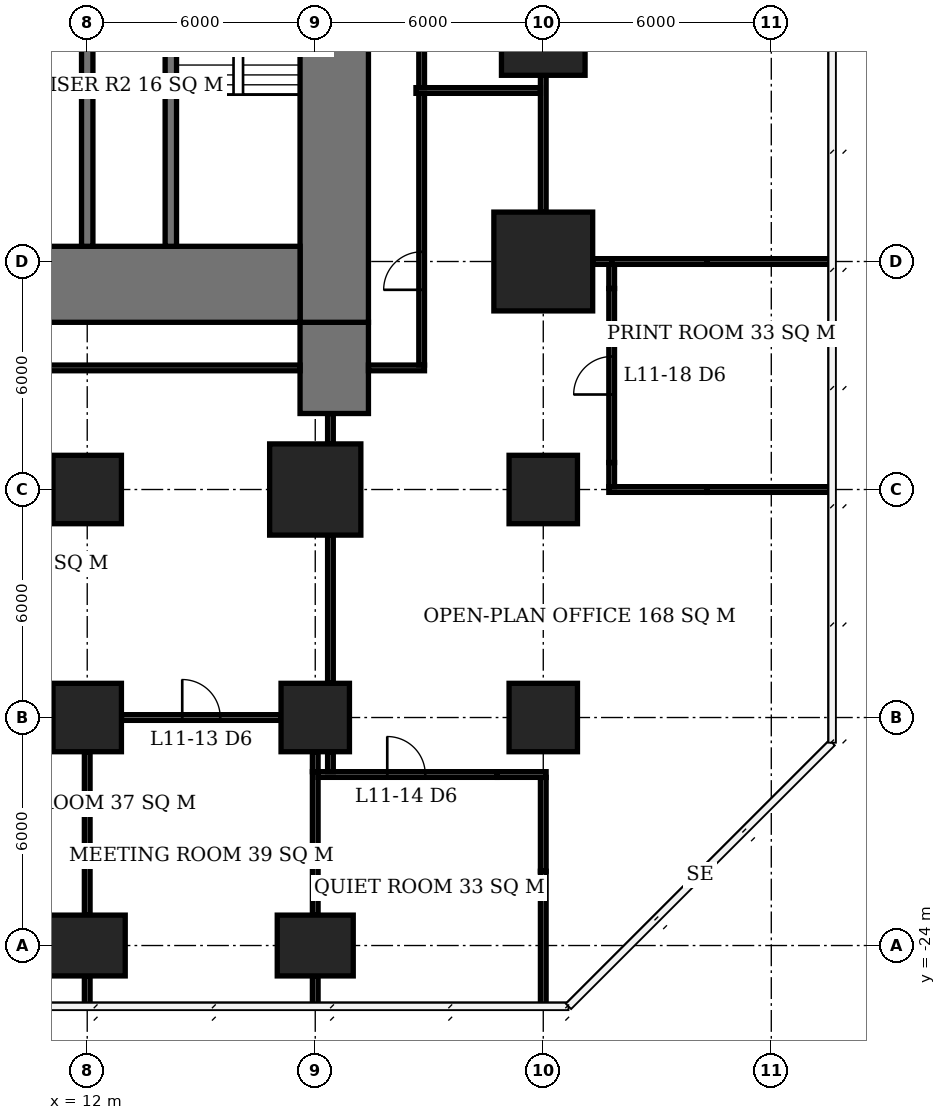
"""IFC4 building model, lengths in metres.
Left out: names, types, materials, properties, quantities, classifications, styles, units other than length and angle.
Written with IfcOpenShell. Run it as: python <this file> out.ifc"""

import sys

from ifc_helpers import new_model, si_unit, direction, frame, frame_2d, origin, origin_2d, place, context, subcontext, project, spatial, rectangle, extrude, element, fill, save


model = new_model("IFC4")
c1 = context("Model", 3, precision=1e-05, world=origin(), true_north=direction((0.0, 1.0)))
c2 = subcontext(c1, "Body", "Model", "MODEL_VIEW")
j1 = project(units=[si_unit("LENGTHUNIT", "METRE"), si_unit("PLANEANGLEUNIT", "RADIAN")], contexts=[c1])
p1 = place(None, origin())
s1 = spatial("IfcSite", under=j1, at=p1, CompositionType="ELEMENT")
p2 = place(p1, origin())
s2 = spatial("IfcBuilding", under=s1, at=p2, CompositionType="ELEMENT")
p3 = place(p2, frame((0.0, 0.0, 49.4)))
s3 = spatial("IfcBuildingStorey", under=s2, at=p3, CompositionType="ELEMENT", Elevation=49.4)
p4 = place(p3, frame((12.0, -24.0, 0.0), z_axis=(0.0, 0.0, 1.0), x_axis=(1.0, 0.0, 0.0)))
e1 = element("IfcColumn", 1, at=p4, inside=s3, PredefinedType="COLUMN", context=c2, shape_type="SweptSolid", body=[
    extrude(rectangle(XDim=2.0, YDim=1.6, at=origin_2d()), origin(), (0.0, 0.0, 1.0), 3.9),
])
for number, where, z_axis, x_axis in (
    (2, (12.0, -18.0, 0.0), (0.0, 0.0, 1.0), (1.0, 0.0, 0.0)),
    (3, (12.0, -12.0, 0.0), (0.0, 0.0, 1.0), (1.0, 0.0, 0.0)),
):
    element("IfcColumn", number, at=place(p3, frame(where, z_axis=z_axis, x_axis=x_axis)), inside=s3, PredefinedType="COLUMN", context=c2, shape_type="SweptSolid", body=[
        extrude(rectangle(XDim=1.8, YDim=1.8, at=origin_2d()), origin(), (0.0, 0.0, 1.0), 3.9),
    ])
p5 = place(p3, frame((18.0, -24.0, 0.0), z_axis=(0.0, 0.0, 1.0), x_axis=(1.0, 0.0, 0.0)))
e4 = element("IfcColumn", 4, at=p5, inside=s3, PredefinedType="COLUMN", context=c2, shape_type="SweptSolid", body=[
    extrude(rectangle(XDim=2.0, YDim=1.6, at=origin_2d()), origin(), (0.0, 0.0, 1.0), 3.9),
])
p6 = place(p3, frame((18.0, -18.0, 0.0), z_axis=(0.0, 0.0, 1.0), x_axis=(1.0, 0.0, 0.0)))
e5 = element("IfcColumn", 5, at=p6, inside=s3, PredefinedType="COLUMN", context=c2, shape_type="SweptSolid", body=[
    extrude(rectangle(XDim=1.8, YDim=1.8, at=origin_2d()), origin(), (0.0, 0.0, 1.0), 3.9),
])
p7 = place(p3, frame((18.0, -12.0, 0.0), z_axis=(0.0, 0.0, 1.0), x_axis=(1.0, 0.0, 0.0)))
e6 = element("IfcColumn", 6, at=p7, inside=s3, PredefinedType="COLUMN", context=c2, shape_type="SweptSolid", body=[
    extrude(rectangle(XDim=2.4, YDim=2.4, at=origin_2d()), origin(), (0.0, 0.0, 1.0), 3.9),
])
for number, where, z_axis, x_axis in (
    (7, (24.0, -18.0, 0.0), (0.0, 0.0, 1.0), (1.0, 0.0, 0.0)),
    (8, (24.0, -12.0, 0.0), (0.0, 0.0, 1.0), (1.0, 0.0, 0.0)),
):
    element("IfcColumn", number, at=place(p3, frame(where, z_axis=z_axis, x_axis=x_axis)), inside=s3, PredefinedType="COLUMN", context=c2, shape_type="SweptSolid", body=[
        extrude(rectangle(XDim=1.8, YDim=1.8, at=origin_2d()), origin(), (0.0, 0.0, 1.0), 3.9),
    ])
p8 = place(p3, frame((24.0, -6.0, 0.0), z_axis=(0.0, 0.0, 1.0), x_axis=(1.0, 0.0, 0.0)))
e9 = element("IfcColumn", 9, at=p8, inside=s3, PredefinedType="COLUMN", context=c2, shape_type="SweptSolid", body=[
    extrude(rectangle(XDim=2.6, YDim=2.6, at=origin_2d()), origin(), (0.0, 0.0, 1.0), 3.9),
])
p9 = place(p3, frame((24.0, 0.0, 0.0), z_axis=(0.0, 0.0, 1.0), x_axis=(1.0, 0.0, 0.0)))
e10 = element("IfcColumn", 10, at=p9, inside=s3, PredefinedType="COLUMN", context=c2, shape_type="SweptSolid", body=[
    extrude(rectangle(XDim=2.2, YDim=2.2, at=origin_2d()), origin(), (0.0, 0.0, 1.0), 3.9),
])
p10 = place(p3, frame((-5.6, -6.6, 0.0), z_axis=(0.0, 0.0, 1.0), x_axis=(1.0, 0.0, 0.0)))
e11 = element("IfcWall", 11, at=p10, inside=s3, PredefinedType="SHEAR", context=c2, shape_type="SweptSolid", body=[
    extrude(rectangle(XDim=23.2, YDim=2.0, at=frame_2d((11.6, 0.0))), origin(), (0.0, 0.0, 1.0), 3.9),
])
p11 = place(p3, frame((18.5, -7.6, 0.0), z_axis=(0.0, 0.0, 1.0), x_axis=(0.0, 1.0, 0.0)))
e12 = element("IfcWall", 12, at=p11, inside=s3, PredefinedType="SHEAR", context=c2, shape_type="SweptSolid", body=[
    extrude(rectangle(XDim=21.2, YDim=1.8, at=frame_2d((10.6, 0.0))), origin(), (0.0, 0.0, 1.0), 3.9),
])
p12 = place(p11, frame((9.2, 0.0, 0.0)))
e13 = element("IfcOpeningElement", 13, at=p12, cuts=e12, PredefinedType="OPENING", context=c2, shape_type="SweptSolid", body=[
    extrude(rectangle(XDim=1.8, YDim=2.4, at=frame_2d((0.9, 1.2))), frame((0.0, 0.91, 0.0), z_axis=(0.0, -1.0, 0.0), x_axis=(1.0, 0.0, 0.0)), (0.0, 0.0, 1.0), 1.82),
])
p13 = place(p3, frame((18.5, -10.0, 0.0), z_axis=(0.0, 0.0, 1.0), x_axis=(0.0, 1.0, 0.0)))
e14 = element("IfcWall", 14, at=p13, inside=s3, PredefinedType="SHEAR", context=c2, shape_type="SweptSolid", body=[
    extrude(rectangle(XDim=2.4, YDim=1.8, at=frame_2d((1.2, 0.0))), origin(), (0.0, 0.0, 1.0), 3.9),
])
p14 = place(p3, frame((12.0, -5.6, 0.0), z_axis=(0.0, 0.0, 1.0), x_axis=(0.0, 1.0, 0.0)))
e15 = element("IfcWall", 15, at=p14, inside=s3, PredefinedType="SHEAR", context=c2, shape_type="SweptSolid", body=[
    extrude(rectangle(XDim=5.45, YDim=0.3, at=frame_2d((2.725, 0.0))), origin(), (0.0, 0.0, 1.0), 3.9),
])
p15 = place(p3, frame((14.2, -5.6, 0.0), z_axis=(0.0, 0.0, 1.0), x_axis=(0.0, 1.0, 0.0)))
e16 = element("IfcWall", 16, at=p15, inside=s3, PredefinedType="SHEAR", context=c2, shape_type="SweptSolid", body=[
    extrude(rectangle(XDim=8.45, YDim=0.3, at=frame_2d((4.225, 0.0))), origin(), (0.0, 0.0, 1.0), 3.9),
])
p16 = place(p3, frame((18.075, -19.5, 0.0), z_axis=(0.0, 0.0, 1.0), x_axis=(1.0, 0.0, 0.0)))
e17 = element("IfcWall", 17, at=p16, inside=s3, PredefinedType="PARTITIONING", context=c2, shape_type="SweptSolid", body=[
    extrude(rectangle(XDim=4.715, YDim=0.15, at=frame_2d((2.357, 0.0))), origin(), (0.0, 0.0, 1.0), 3.65),
])
p17 = place(p16, frame((1.82, 0.0, 0.0)))
e18 = element("IfcOpeningElement", 18, at=p17, cuts=e17, PredefinedType="OPENING", context=c2, shape_type="SweptSolid", body=[
    extrude(rectangle(XDim=1.0, YDim=2.1, at=frame_2d((0.5, 1.05))), frame((0.0, 0.085, 0.0), z_axis=(0.0, -1.0, 0.0), x_axis=(1.0, 0.0, 0.0)), (0.0, 0.0, 1.0), 0.17),
])
p18 = place(p3, frame((22.79, -19.5, 0.0), z_axis=(0.0, 0.0, 1.0), x_axis=(1.0, 0.0, 0.0)))
e19 = element("IfcWall", 19, at=p18, inside=s3, PredefinedType="PARTITIONING", context=c2, shape_type="SweptSolid", body=[
    extrude(rectangle(XDim=1.285, YDim=0.15, at=frame_2d((0.643, 0.0))), origin(), (0.0, 0.0, 1.0), 2.65),
])
p19 = place(p3, frame((6.9, -18.6, 0.0), z_axis=(0.0, 0.0, 1.0), x_axis=(1.0, 0.0, 0.0)))
e20 = element("IfcWall", 20, at=p19, inside=s3, PredefinedType="PARTITIONING", context=c2, shape_type="SweptSolid", body=[
    extrude(rectangle(XDim=4.2, YDim=0.15, at=frame_2d((2.1, 0.0))), origin(), (0.0, 0.0, 1.0), 3.65),
])
p20 = place(p19, frame((1.6, 0.0, 0.0)))
e21 = element("IfcOpeningElement", 21, at=p20, cuts=e20, PredefinedType="OPENING", context=c2, shape_type="SweptSolid", body=[
    extrude(rectangle(XDim=1.0, YDim=2.1, at=frame_2d((0.5, 1.05))), frame((0.0, 0.085, 0.0), z_axis=(0.0, -1.0, 0.0), x_axis=(1.0, 0.0, 0.0)), (0.0, 0.0, 1.0), 0.17),
])
p21 = place(p3, frame((12.9, -18.0, 0.0), z_axis=(0.0, 0.0, 1.0), x_axis=(1.0, 0.0, 0.0)))
e22 = element("IfcWall", 22, at=p21, inside=s3, PredefinedType="PARTITIONING", context=c2, shape_type="SweptSolid", body=[
    extrude(rectangle(XDim=4.2, YDim=0.15, at=frame_2d((2.1, 0.0))), origin(), (0.0, 0.0, 1.0), 3.65),
])
p22 = place(p21, frame((1.6, 0.0, 0.0)))
e23 = element("IfcOpeningElement", 23, at=p22, cuts=e22, PredefinedType="OPENING", context=c2, shape_type="SweptSolid", body=[
    extrude(rectangle(XDim=1.0, YDim=2.1, at=frame_2d((0.5, 1.05))), frame((0.0, 0.085, 0.0), z_axis=(0.0, -1.0, 0.0), x_axis=(1.0, 0.0, 0.0)), (0.0, 0.0, 1.0), 0.17),
])
p23 = place(p3, frame((25.725, -12.0, 0.0), z_axis=(0.0, 0.0, 1.0), x_axis=(1.0, 0.0, 0.0)))
e24 = element("IfcWall", 24, at=p23, inside=s3, PredefinedType="PARTITIONING", context=c2, shape_type="SweptSolid", body=[
    extrude(rectangle(XDim=2.585, YDim=0.15, at=frame_2d((1.292, 0.0))), origin(), (0.0, 0.0, 1.0), 2.65),
])
p24 = place(p3, frame((28.31, -12.0, 0.0), z_axis=(0.0, 0.0, 1.0), x_axis=(1.0, 0.0, 0.0)))
e25 = element("IfcWall", 25, at=p24, inside=s3, PredefinedType="PARTITIONING", context=c2, shape_type="SweptSolid", body=[
    extrude(rectangle(XDim=3.29, YDim=0.15, at=frame_2d((1.645, 0.0))), origin(), (0.0, 0.0, 1.0), 3.65),
])
p25 = place(p3, frame((25.3, -6.0, 0.0), z_axis=(0.0, 0.0, 1.0), x_axis=(1.0, 0.0, 0.0)))
e26 = element("IfcWall", 26, at=p25, inside=s3, PredefinedType="PARTITIONING", context=c2, shape_type="SweptSolid", body=[
    extrude(rectangle(XDim=0.575, YDim=0.15, at=frame_2d((0.288, 0.0))), origin(), (0.0, 0.0, 1.0), 2.65),
])
p26 = place(p3, frame((25.8, -6.0, 0.0), z_axis=(0.0, 0.0, 1.0), x_axis=(1.0, 0.0, 0.0)))
e27 = element("IfcWall", 27, at=p26, inside=s3, PredefinedType="PARTITIONING", context=c2, shape_type="SweptSolid", body=[
    extrude(rectangle(XDim=2.51, YDim=0.15, at=frame_2d((1.255, 0.0))), origin(), (0.0, 0.0, 1.0), 2.65),
])
p27 = place(p3, frame((28.31, -6.0, 0.0), z_axis=(0.0, 0.0, 1.0), x_axis=(1.0, 0.0, 0.0)))
e28 = element("IfcWall", 28, at=p27, inside=s3, PredefinedType="PARTITIONING", context=c2, shape_type="SweptSolid", body=[
    extrude(rectangle(XDim=3.29, YDim=0.15, at=frame_2d((1.645, 0.0))), origin(), (0.0, 0.0, 1.0), 3.65),
])
p28 = place(p3, frame((12.0, -25.6, 0.0), z_axis=(0.0, 0.0, 1.0), x_axis=(0.0, 1.0, 0.0)))
e29 = element("IfcWall", 29, at=p28, inside=s3, PredefinedType="PARTITIONING", context=c2, shape_type="SweptSolid", body=[
    extrude(rectangle(XDim=0.8, YDim=0.15, at=frame_2d((0.4, 0.0))), origin(), (0.0, 0.0, 1.0), 3.65),
])
p29 = place(p3, frame((12.0, -23.2, 0.0), z_axis=(0.0, 0.0, 1.0), x_axis=(0.0, 1.0, 0.0)))
e30 = element("IfcWall", 30, at=p29, inside=s3, PredefinedType="PARTITIONING", context=c2, shape_type="SweptSolid", body=[
    extrude(rectangle(XDim=4.3, YDim=0.15, at=frame_2d((2.15, 0.0))), origin(), (0.0, 0.0, 1.0), 3.65),
])
p30 = place(p3, frame((18.0, -25.6, 0.0), z_axis=(0.0, 0.0, 1.0), x_axis=(0.0, 1.0, 0.0)))
e31 = element("IfcWall", 31, at=p30, inside=s3, PredefinedType="PARTITIONING", context=c2, shape_type="SweptSolid", body=[
    extrude(rectangle(XDim=0.8, YDim=0.15, at=frame_2d((0.4, 0.0))), origin(), (0.0, 0.0, 1.0), 3.65),
])
p31 = place(p3, frame((18.0, -23.2, 0.0), z_axis=(0.0, 0.0, 1.0), x_axis=(0.0, 1.0, 0.0)))
e32 = element("IfcWall", 32, at=p31, inside=s3, PredefinedType="PARTITIONING", context=c2, shape_type="SweptSolid", body=[
    extrude(rectangle(XDim=3.775, YDim=0.15, at=frame_2d((1.887, 0.0))), origin(), (0.0, 0.0, 1.0), 3.65),
])
p32 = place(p3, frame((18.0, -19.425, 0.0), z_axis=(0.0, 0.0, 1.0), x_axis=(0.0, 1.0, 0.0)))
e33 = element("IfcWall", 33, at=p32, inside=s3, PredefinedType="PARTITIONING", context=c2, shape_type="SweptSolid", body=[
    extrude(rectangle(XDim=0.525, YDim=0.15, at=frame_2d((0.263, 0.0))), origin(), (0.0, 0.0, 1.0), 3.65),
])
p33 = place(p3, frame((24.0, -25.6, 0.0), z_axis=(0.0, 0.0, 1.0), x_axis=(0.0, 1.0, 0.0)))
e34 = element("IfcWall", 34, at=p33, inside=s3, PredefinedType="PARTITIONING", context=c2, shape_type="SweptSolid", body=[
    extrude(rectangle(XDim=3.555, YDim=0.15, at=frame_2d((1.778, 0.0))), origin(), (0.0, 0.0, 1.0), 3.65),
])
p34 = place(p3, frame((24.0, -22.045, 0.0), z_axis=(0.0, 0.0, 1.0), x_axis=(0.0, 1.0, 0.0)))
e35 = element("IfcWall", 35, at=p34, inside=s3, PredefinedType="PARTITIONING", context=c2, shape_type="SweptSolid", body=[
    extrude(rectangle(XDim=2.47, YDim=0.15, at=frame_2d((1.235, 0.0))), origin(), (0.0, 0.0, 1.0), 2.65),
])
p35 = place(p3, frame((24.0, -4.7, 0.0), z_axis=(0.0, 0.0, 1.0), x_axis=(0.0, 1.0, 0.0)))
e36 = element("IfcWall", 36, at=p35, inside=s3, PredefinedType="PARTITIONING", context=c2, shape_type="SweptSolid", body=[
    extrude(rectangle(XDim=3.6, YDim=0.15, at=frame_2d((1.8, 0.0))), origin(), (0.0, 0.0, 1.0), 3.65),
])
p36 = place(p3, frame((25.8, -11.925, 0.0), z_axis=(0.0, 0.0, 1.0), x_axis=(0.0, 1.0, 0.0)))
e37 = element("IfcWall", 37, at=p36, inside=s3, PredefinedType="PARTITIONING", context=c2, shape_type="SweptSolid", body=[
    extrude(rectangle(XDim=0.635, YDim=0.15, at=frame_2d((0.317, 0.0))), origin(), (0.0, 0.0, 1.0), 2.65),
])
p37 = place(p3, frame((25.8, -11.29, 0.0), z_axis=(0.0, 0.0, 1.0), x_axis=(0.0, 1.0, 0.0)))
e38 = element("IfcWall", 38, at=p37, inside=s3, PredefinedType="PARTITIONING", context=c2, shape_type="SweptSolid", body=[
    extrude(rectangle(XDim=4.58, YDim=0.15, at=frame_2d((2.29, 0.0))), origin(), (0.0, 0.0, 1.0), 3.65),
])
p38 = place(p37, frame((1.79, 0.0, 0.0)))
e39 = element("IfcOpeningElement", 39, at=p38, cuts=e38, PredefinedType="OPENING", context=c2, shape_type="SweptSolid", body=[
    extrude(rectangle(XDim=1.0, YDim=2.1, at=frame_2d((0.5, 1.05))), frame((0.0, 0.085, 0.0), z_axis=(0.0, -1.0, 0.0), x_axis=(1.0, 0.0, 0.0)), (0.0, 0.0, 1.0), 0.17),
])
p39 = place(p3, frame((25.8, -6.71, 0.0), z_axis=(0.0, 0.0, 1.0), x_axis=(0.0, 1.0, 0.0)))
e40 = element("IfcWall", 40, at=p39, inside=s3, PredefinedType="PARTITIONING", context=c2, shape_type="SweptSolid", body=[
    extrude(rectangle(XDim=0.635, YDim=0.15, at=frame_2d((0.317, 0.0))), origin(), (0.0, 0.0, 1.0), 2.65),
])
p40 = place(p3, frame((-1.425, -8.8, 0.0), z_axis=(0.0, 0.0, 1.0), x_axis=(1.0, 0.0, 0.0)))
e41 = element("IfcWall", 41, at=p40, inside=s3, PredefinedType="PARTITIONING", context=c2, shape_type="SweptSolid", body=[
    extrude(rectangle(XDim=19.025, YDim=0.15, at=frame_2d((9.513, 0.0))), origin(), (0.0, 0.0, 1.0), 3.65),
])
p41 = place(p40, frame((6.11, 0.0, 0.0)))
e42 = element("IfcOpeningElement", 42, at=p41, cuts=e41, PredefinedType="OPENING", context=c2, shape_type="SweptSolid", body=[
    extrude(rectangle(XDim=1.0, YDim=2.1, at=frame_2d((0.5, 1.05))), frame((0.0, 0.085, 0.0), z_axis=(0.0, -1.0, 0.0), x_axis=(1.0, 0.0, 0.0)), (0.0, 0.0, 1.0), 0.17),
])
p42 = place(p3, frame((18.4, -19.425, 0.0), z_axis=(0.0, 0.0, 1.0), x_axis=(0.0, 1.0, 0.0)))
e43 = element("IfcWall", 43, at=p42, inside=s3, PredefinedType="PARTITIONING", context=c2, shape_type="SweptSolid", body=[
    extrude(rectangle(XDim=0.525, YDim=0.15, at=frame_2d((0.263, 0.0))), origin(), (0.0, 0.0, 1.0), 3.65),
])
p43 = place(p3, frame((18.4, -17.1, 0.0), z_axis=(0.0, 0.0, 1.0), x_axis=(0.0, 1.0, 0.0)))
e44 = element("IfcWall", 44, at=p43, inside=s3, PredefinedType="PARTITIONING", context=c2, shape_type="SweptSolid", body=[
    extrude(rectangle(XDim=3.9, YDim=0.15, at=frame_2d((1.95, 0.0))), origin(), (0.0, 0.0, 1.0), 3.65),
])
p44 = place(p3, frame((18.4, -10.8, 0.0), z_axis=(0.0, 0.0, 1.0), x_axis=(0.0, 1.0, 0.0)))
e45 = element("IfcWall", 45, at=p44, inside=s3, PredefinedType="PARTITIONING", context=c2, shape_type="SweptSolid", body=[
    extrude(rectangle(XDim=0.8, YDim=0.15, at=frame_2d((0.4, 0.0))), origin(), (0.0, 0.0, 1.0), 3.65),
])
p45 = place(p3, frame((19.4, -8.8, 0.0), z_axis=(0.0, 0.0, 1.0), x_axis=(1.0, 0.0, 0.0)))
e46 = element("IfcWall", 46, at=p45, inside=s3, PredefinedType="PARTITIONING", context=c2, shape_type="SweptSolid", body=[
    extrude(rectangle(XDim=1.475, YDim=0.15, at=frame_2d((0.738, 0.0))), origin(), (0.0, 0.0, 1.0), 3.65),
])
p46 = place(p3, frame((20.8, -8.725, 0.0), z_axis=(0.0, 0.0, 1.0), x_axis=(0.0, 1.0, 0.0)))
e47 = element("IfcWall", 47, at=p46, inside=s3, PredefinedType="PARTITIONING", context=c2, shape_type="SweptSolid", body=[
    extrude(rectangle(XDim=7.15, YDim=0.15, at=frame_2d((3.575, 0.0))), origin(), (0.0, 0.0, 1.0), 3.65),
])
p47 = place(p46, frame((1.98, 0.0, 0.0)))
e48 = element("IfcOpeningElement", 48, at=p47, cuts=e47, PredefinedType="OPENING", context=c2, shape_type="SweptSolid", body=[
    extrude(rectangle(XDim=1.0, YDim=2.1, at=frame_2d((0.5, 1.05))), frame((0.0, 0.085, 0.0), z_axis=(0.0, -1.0, 0.0), x_axis=(1.0, 0.0, 0.0)), (0.0, 0.0, 1.0), 0.17),
])
p48 = place(p3, frame((20.8, -1.425, 0.0), z_axis=(0.0, 0.0, 1.0), x_axis=(0.0, 1.0, 0.0)))
e49 = element("IfcWall", 49, at=p48, inside=s3, PredefinedType="PARTITIONING", context=c2, shape_type="SweptSolid", body=[
    extrude(rectangle(XDim=14.925, YDim=0.15, at=frame_2d((7.462, 0.0))), origin(), (0.0, 0.0, 1.0), 3.65),
])
p49 = place(p48, frame((9.175, 0.0, 0.0)))
e50 = element("IfcOpeningElement", 50, at=p49, cuts=e49, PredefinedType="OPENING", context=c2, shape_type="SweptSolid", body=[
    extrude(rectangle(XDim=1.0, YDim=2.1, at=frame_2d((0.5, 1.05))), frame((0.0, 0.085, 0.0), z_axis=(0.0, -1.0, 0.0), x_axis=(1.0, 0.0, 0.0)), (0.0, 0.0, 1.0), 0.17),
])
p50 = place(p3, frame((20.65, -1.5, 0.0), z_axis=(0.0, 0.0, 1.0), x_axis=(1.0, 0.0, 0.0)))
e51 = element("IfcWall", 51, at=p50, inside=s3, PredefinedType="PARTITIONING", context=c2, shape_type="SweptSolid", body=[
    extrude(rectangle(XDim=3.275, YDim=0.15, at=frame_2d((1.638, 0.0))), origin(), (0.0, 0.0, 1.0), 3.65),
])
p51 = place(p22, origin())
e52 = element("IfcDoor", 52, at=p51, inside=s3, OperationType="SINGLE_SWING_LEFT", PredefinedType="DOOR", context=c2, shape_type="SweptSolid", body=[
    extrude(rectangle(XDim=1.0, YDim=2.1, at=frame_2d((0.5, 1.05))), frame((0.0, 0.025, 0.0), z_axis=(0.0, -1.0, 0.0), x_axis=(1.0, 0.0, 0.0)), (0.0, 0.0, 1.0), 0.05),
])
fill(e23, e52)
p52 = place(p17, origin())
e53 = element("IfcDoor", 53, at=p52, inside=s3, OperationType="SINGLE_SWING_LEFT", PredefinedType="DOOR", context=c2, shape_type="SweptSolid", body=[
    extrude(rectangle(XDim=1.0, YDim=2.1, at=frame_2d((0.5, 1.05))), frame((0.0, 0.025, 0.0), z_axis=(0.0, -1.0, 0.0), x_axis=(1.0, 0.0, 0.0)), (0.0, 0.0, 1.0), 0.05),
])
fill(e18, e53)
p53 = place(p38, origin())
e54 = element("IfcDoor", 54, at=p53, inside=s3, OperationType="SINGLE_SWING_LEFT", PredefinedType="DOOR", context=c2, shape_type="SweptSolid", body=[
    extrude(rectangle(XDim=1.0, YDim=2.1, at=frame_2d((0.5, 1.05))), frame((0.0, 0.025, 0.0), z_axis=(0.0, -1.0, 0.0), x_axis=(1.0, 0.0, 0.0)), (0.0, 0.0, 1.0), 0.05),
])
fill(e39, e54)
p54 = place(p47, origin())
e55 = element("IfcDoor", 55, at=p54, inside=s3, OperationType="SINGLE_SWING_LEFT", PredefinedType="DOOR", context=c2, shape_type="SweptSolid", body=[
    extrude(rectangle(XDim=1.0, YDim=2.1, at=frame_2d((0.5, 1.05))), frame((0.0, 0.025, 0.0), z_axis=(0.0, -1.0, 0.0), x_axis=(1.0, 0.0, 0.0)), (0.0, 0.0, 1.0), 0.05),
])
fill(e48, e55)
save(model, sys.argv[1])
